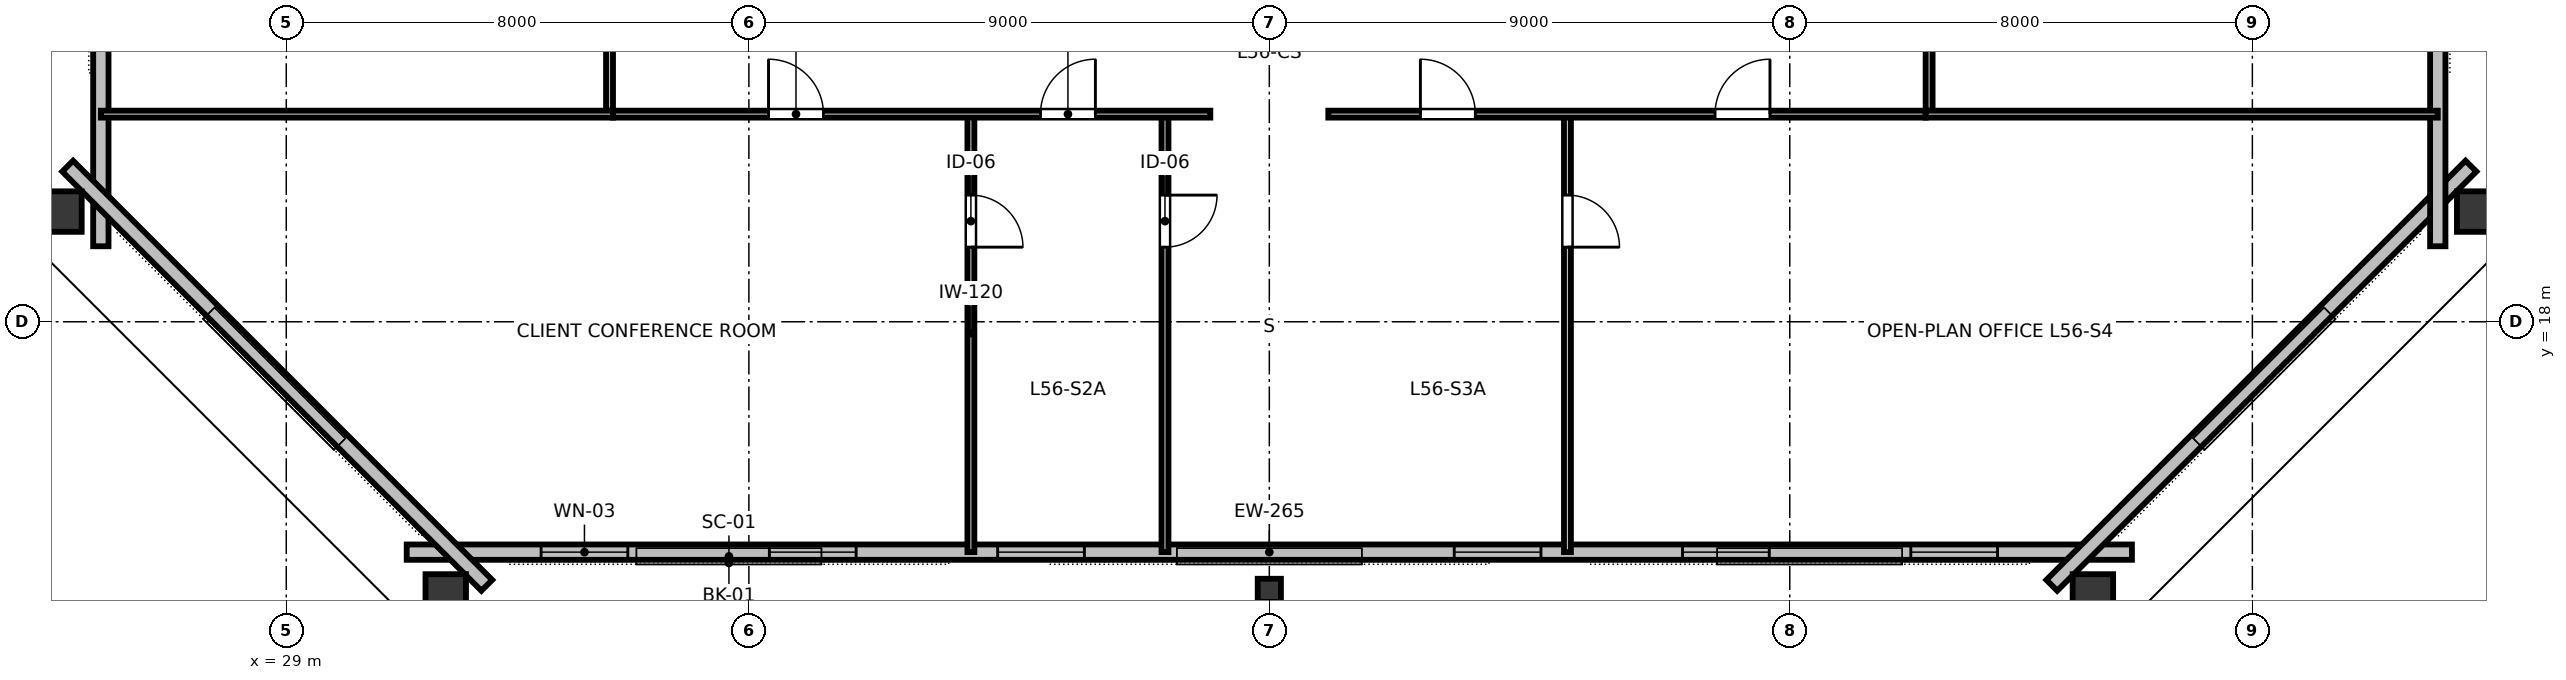
"""IFC4 building model, lengths in metres.
Left out: names, types, materials, properties, quantities, classifications, styles, units other than length and angle.
Written with IfcOpenShell. Run it as: python <this file> out.ifc"""

import sys

from ifc_helpers import new_model, si_unit, direction, frame, frame_2d, origin, origin_2d, place, context, subcontext, project, spatial, rectangle, hollow_rectangle, i_section, extrude, element, fill, save


model = new_model("IFC4")
c1 = context("Model", 3, precision=1e-05, world=origin(), true_north=direction((0.0, 1.0)))
c2 = subcontext(c1, "Body", "Model", "MODEL_VIEW")
j1 = project(units=[si_unit("LENGTHUNIT", "METRE"), si_unit("PLANEANGLEUNIT", "RADIAN")], contexts=[c1])
p1 = place(None, origin())
s1 = spatial("IfcSite", under=j1, at=p1, CompositionType="ELEMENT")
p2 = place(p1, origin())
s2 = spatial("IfcBuilding", under=s1, at=p2, CompositionType="ELEMENT")
p3 = place(p2, frame((0.0, 0.0, 213.0)))
s3 = spatial("IfcBuildingStorey", under=s2, at=p3, CompositionType="ELEMENT", Elevation=213.0)
p4 = place(p3, frame((31.758, 13.21, 0.0), z_axis=(0.0, 0.0, 1.0), x_axis=(1.0, 0.0, 0.0)))
e1 = element("IfcColumn", 1, at=p4, inside=s3, PredefinedType="COLUMN", context=c2, shape_type="SweptSolid", body=[
    extrude(hollow_rectangle(XDim=0.7, YDim=0.85, WallThickness=0.04, at=origin_2d()), origin(), (0.0, 0.0, 1.0), 3.373),
])
p5 = place(p3, frame((46.0, 13.356, 0.0), z_axis=(0.0, 0.0, 1.0), x_axis=(1.0, 0.0, 0.0)))
e2 = element("IfcColumn", 2, at=p5, inside=s3, PredefinedType="COLUMN", context=c2, shape_type="SweptSolid", body=[
    extrude(i_section(OverallWidth=0.401, OverallDepth=0.399, WebThickness=0.025, FlangeThickness=0.04, FilletRadius=0.025, at=origin_2d()), origin(), (0.0, 0.0, 1.0), 3.373),
])
for number, where, z_axis, x_axis in (
    (3, (60.242, 13.21, 0.0), (0.0, 0.0, 1.0), (1.0, 0.0, 0.0)),
    (4, (66.963, 19.905, 0.0), (0.0, 0.0, 1.0), (0.0, 1.0, 0.0)),
    (5, (25.037, 19.905, 0.0), (0.0, 0.0, 1.0), (0.0, 1.0, 0.0)),
):
    element("IfcColumn", number, at=place(p3, frame(where, z_axis=z_axis, x_axis=x_axis)), inside=s3, PredefinedType="COLUMN", context=c2, shape_type="SweptSolid", body=[
        extrude(hollow_rectangle(XDim=0.7, YDim=0.85, WallThickness=0.04, at=origin_2d()), origin(), (0.0, 0.0, 1.0), 3.373),
    ])
p6 = place(p3, frame((31.083, 14.016, 0.0), z_axis=(0.0, 0.0, 1.0), x_axis=(1.0, 0.0, 0.0)))
e6 = element("IfcWall", 6, at=p6, inside=s3, PredefinedType="STANDARD", context=c2, shape_type="SweptSolid", body=[
    extrude(rectangle(XDim=29.834, YDim=0.265, at=frame_2d((14.917, 0.0))), origin(), (0.0, 0.0, 1.0), 3.375),
])
p7 = place(p6, frame((2.324, 0.0, 0.85)))
e7 = element("IfcOpeningElement", 7, at=p7, cuts=e6, PredefinedType="OPENING", context=c2, shape_type="SweptSolid", body=[
    extrude(rectangle(XDim=1.5, YDim=1.85, at=frame_2d((0.75, 0.925))), frame((0.0, 0.142, 0.0), z_axis=(0.0, -1.0, 0.0), x_axis=(1.0, 0.0, 0.0)), (0.0, 0.0, 1.0), 0.285),
])
p8 = place(p6, frame((6.272, 0.0, 0.85)))
e8 = element("IfcOpeningElement", 8, at=p8, cuts=e6, PredefinedType="OPENING", context=c2, shape_type="SweptSolid", body=[
    extrude(rectangle(XDim=1.5, YDim=1.85, at=frame_2d((0.75, 0.925))), frame((0.0, 0.142, 0.0), z_axis=(0.0, -1.0, 0.0), x_axis=(1.0, 0.0, 0.0)), (0.0, 0.0, 1.0), 0.285),
])
p9 = place(p6, frame((10.219, 0.0, 0.85)))
e9 = element("IfcOpeningElement", 9, at=p9, cuts=e6, PredefinedType="OPENING", context=c2, shape_type="SweptSolid", body=[
    extrude(rectangle(XDim=1.5, YDim=1.85, at=frame_2d((0.75, 0.925))), frame((0.0, 0.142, 0.0), z_axis=(0.0, -1.0, 0.0), x_axis=(1.0, 0.0, 0.0)), (0.0, 0.0, 1.0), 0.285),
])
p10 = place(p6, frame((18.115, 0.0, 0.85)))
e10 = element("IfcOpeningElement", 10, at=p10, cuts=e6, PredefinedType="OPENING", context=c2, shape_type="SweptSolid", body=[
    extrude(rectangle(XDim=1.5, YDim=1.85, at=frame_2d((0.75, 0.925))), frame((0.0, 0.142, 0.0), z_axis=(0.0, -1.0, 0.0), x_axis=(1.0, 0.0, 0.0)), (0.0, 0.0, 1.0), 0.285),
])
p11 = place(p6, frame((22.063, 0.0, 0.85)))
e11 = element("IfcOpeningElement", 11, at=p11, cuts=e6, PredefinedType="OPENING", context=c2, shape_type="SweptSolid", body=[
    extrude(rectangle(XDim=1.5, YDim=1.85, at=frame_2d((0.75, 0.925))), frame((0.0, 0.142, 0.0), z_axis=(0.0, -1.0, 0.0), x_axis=(1.0, 0.0, 0.0)), (0.0, 0.0, 1.0), 0.285),
])
p12 = place(p6, frame((26.011, 0.0, 0.85)))
e12 = element("IfcOpeningElement", 12, at=p12, cuts=e6, PredefinedType="OPENING", context=c2, shape_type="SweptSolid", body=[
    extrude(rectangle(XDim=1.5, YDim=1.85, at=frame_2d((0.75, 0.925))), frame((0.0, 0.142, 0.0), z_axis=(0.0, -1.0, 0.0), x_axis=(1.0, 0.0, 0.0)), (0.0, 0.0, 1.0), 0.285),
])
p13 = place(p3, frame((59.532, 13.442, 0.0), z_axis=(0.0, 0.0, 1.0), x_axis=(0.707106781187, 0.707106781187, 0.0)))
e13 = element("IfcWall", 13, at=p13, inside=s3, PredefinedType="STANDARD", context=c2, shape_type="SweptSolid", body=[
    extrude(rectangle(XDim=10.251, YDim=0.265, at=frame_2d((5.125, 0.0))), origin(), (0.0, 0.0, 1.0), 3.375),
])
p14 = place(p3, frame((66.206, 19.305, 0.0), z_axis=(0.0, 0.0, 1.0), x_axis=(0.0, 1.0, 0.0)))
e14 = element("IfcWall", 14, at=p14, inside=s3, PredefinedType="STANDARD", context=c2, shape_type="SweptSolid", body=[
    extrude(rectangle(XDim=25.389, YDim=0.265, at=frame_2d((12.695, 0.0))), origin(), (0.0, 0.0, 1.0), 3.375),
])
p15 = place(p14, frame((6.147, 0.0, 0.85)))
e15 = element("IfcOpeningElement", 15, at=p15, cuts=e14, PredefinedType="OPENING", context=c2, shape_type="SweptSolid", body=[
    extrude(rectangle(XDim=1.5, YDim=1.85, at=frame_2d((0.75, 0.925))), frame((0.0, 0.142, 0.0), z_axis=(0.0, -1.0, 0.0), x_axis=(1.0, 0.0, 0.0)), (0.0, 0.0, 1.0), 0.285),
])
p16 = place(p14, frame((17.742, 0.0, 0.85)))
e16 = element("IfcOpeningElement", 16, at=p16, cuts=e14, PredefinedType="OPENING", context=c2, shape_type="SweptSolid", body=[
    extrude(rectangle(XDim=1.5, YDim=1.85, at=frame_2d((0.75, 0.925))), frame((0.0, 0.142, 0.0), z_axis=(0.0, -1.0, 0.0), x_axis=(1.0, 0.0, 0.0)), (0.0, 0.0, 1.0), 0.285),
])
p17 = place(p3, frame((25.794, 44.695, 0.0), z_axis=(0.0, 0.0, 1.0), x_axis=(0.0, -1.0, 0.0)))
e17 = element("IfcWall", 17, at=p17, inside=s3, PredefinedType="STANDARD", context=c2, shape_type="SweptSolid", body=[
    extrude(rectangle(XDim=25.389, YDim=0.265, at=frame_2d((12.695, 0.0))), origin(), (0.0, 0.0, 1.0), 3.375),
])
p18 = place(p17, frame((6.147, 0.0, 0.85)))
e18 = element("IfcOpeningElement", 18, at=p18, cuts=e17, PredefinedType="OPENING", context=c2, shape_type="SweptSolid", body=[
    extrude(rectangle(XDim=1.5, YDim=1.85, at=frame_2d((0.75, 0.925))), frame((0.0, 0.142, 0.0), z_axis=(0.0, -1.0, 0.0), x_axis=(1.0, 0.0, 0.0)), (0.0, 0.0, 1.0), 0.285),
])
p19 = place(p17, frame((10.012, 0.0, 0.85)))
e19 = element("IfcOpeningElement", 19, at=p19, cuts=e17, PredefinedType="OPENING", context=c2, shape_type="SweptSolid", body=[
    extrude(rectangle(XDim=1.5, YDim=1.85, at=frame_2d((0.75, 0.925))), frame((0.0, 0.142, 0.0), z_axis=(0.0, -1.0, 0.0), x_axis=(1.0, 0.0, 0.0)), (0.0, 0.0, 1.0), 0.285),
])
p20 = place(p17, frame((13.877, 0.0, 0.85)))
e20 = element("IfcOpeningElement", 20, at=p20, cuts=e17, PredefinedType="OPENING", context=c2, shape_type="SweptSolid", body=[
    extrude(rectangle(XDim=1.5, YDim=1.85, at=frame_2d((0.75, 0.925))), frame((0.0, 0.142, 0.0), z_axis=(0.0, -1.0, 0.0), x_axis=(1.0, 0.0, 0.0)), (0.0, 0.0, 1.0), 0.285),
])
p21 = place(p17, frame((17.742, 0.0, 0.85)))
e21 = element("IfcOpeningElement", 21, at=p21, cuts=e17, PredefinedType="OPENING", context=c2, shape_type="SweptSolid", body=[
    extrude(rectangle(XDim=1.5, YDim=1.85, at=frame_2d((0.75, 0.925))), frame((0.0, 0.142, 0.0), z_axis=(0.0, -1.0, 0.0), x_axis=(1.0, 0.0, 0.0)), (0.0, 0.0, 1.0), 0.285),
])
p22 = place(p3, frame((25.22, 20.691, 0.0), z_axis=(0.0, 0.0, 1.0), x_axis=(0.707106781187, -0.707106781187, 0.0)))
e22 = element("IfcWall", 22, at=p22, inside=s3, PredefinedType="STANDARD", context=c2, shape_type="SweptSolid", body=[
    extrude(rectangle(XDim=10.251, YDim=0.265, at=frame_2d((5.125, 0.0))), origin(), (0.0, 0.0, 1.0), 3.375),
])
p23 = place(p3, frame((40.839, 21.59, 0.0), z_axis=(0.0, 0.0, 1.0), x_axis=(0.0, -1.0, 0.0)))
e23 = element("IfcWall", 23, at=p23, inside=s3, PredefinedType="PARTITIONING", context=c2, shape_type="SweptSolid", body=[
    extrude(rectangle(XDim=7.574, YDim=0.12, at=frame_2d((3.787, 0.0))), origin(), (0.0, 0.0, 1.0), 2.655),
])
p24 = place(p23, frame((1.4, 0.0, 0.0)))
e24 = element("IfcOpeningElement", 24, at=p24, cuts=e23, PredefinedType="OPENING", context=c2, shape_type="SweptSolid", body=[
    extrude(rectangle(XDim=0.9, YDim=2.15, at=frame_2d((0.45, 1.075))), frame((0.0, 0.07, 0.0), z_axis=(0.0, -1.0, 0.0), x_axis=(1.0, 0.0, 0.0)), (0.0, 0.0, 1.0), 0.14),
])
p25 = place(p3, frame((44.196, 21.59, 0.0), z_axis=(0.0, 0.0, 1.0), x_axis=(0.0, -1.0, 0.0)))
e25 = element("IfcWall", 25, at=p25, inside=s3, PredefinedType="PARTITIONING", context=c2, shape_type="SweptSolid", body=[
    extrude(rectangle(XDim=7.574, YDim=0.12, at=frame_2d((3.787, 0.0))), origin(), (0.0, 0.0, 1.0), 2.655),
])
p26 = place(p25, frame((1.4, 0.0, 0.0)))
e26 = element("IfcOpeningElement", 26, at=p26, cuts=e25, PredefinedType="OPENING", context=c2, shape_type="SweptSolid", body=[
    extrude(rectangle(XDim=0.9, YDim=2.15, at=frame_2d((0.45, 1.075))), frame((0.0, 0.07, 0.0), z_axis=(0.0, -1.0, 0.0), x_axis=(1.0, 0.0, 0.0)), (0.0, 0.0, 1.0), 0.14),
])
p27 = place(p3, frame((51.156, 21.59, 0.0), z_axis=(0.0, 0.0, 1.0), x_axis=(0.0, -1.0, 0.0)))
e27 = element("IfcWall", 27, at=p27, inside=s3, PredefinedType="PARTITIONING", context=c2, shape_type="SweptSolid", body=[
    extrude(rectangle(XDim=7.574, YDim=0.12, at=frame_2d((3.787, 0.0))), origin(), (0.0, 0.0, 1.0), 2.655),
])
p28 = place(p27, frame((1.4, 0.0, 0.0)))
e28 = element("IfcOpeningElement", 28, at=p28, cuts=e27, PredefinedType="OPENING", context=c2, shape_type="SweptSolid", body=[
    extrude(rectangle(XDim=0.9, YDim=2.15, at=frame_2d((0.45, 1.075))), frame((0.0, 0.07, 0.0), z_axis=(0.0, -1.0, 0.0), x_axis=(1.0, 0.0, 0.0)), (0.0, 0.0, 1.0), 0.14),
])
p29 = place(p3, frame((34.65, 21.59, 0.0), z_axis=(0.0, 0.0, 1.0), x_axis=(1.0, 0.0, 0.0)))
e29 = element("IfcWall", 29, at=p29, inside=s3, PredefinedType="PARTITIONING", context=c2, shape_type="SweptSolid", body=[
    extrude(rectangle(XDim=10.33, YDim=0.12, at=frame_2d((5.165, 0.0))), origin(), (0.0, 0.0, 1.0), 2.655),
])
p30 = place(p29, frame((2.69, 0.0, 0.0)))
e30 = element("IfcOpeningElement", 30, at=p30, cuts=e29, PredefinedType="OPENING", context=c2, shape_type="SweptSolid", body=[
    extrude(rectangle(XDim=0.95, YDim=2.15, at=frame_2d((0.475, 1.075))), frame((0.0, 0.07, 0.0), z_axis=(0.0, -1.0, 0.0), x_axis=(1.0, 0.0, 0.0)), (0.0, 0.0, 1.0), 0.14),
])
p31 = place(p29, frame((7.393, 0.0, 0.0)))
e31 = element("IfcOpeningElement", 31, at=p31, cuts=e29, PredefinedType="OPENING", context=c2, shape_type="SweptSolid", body=[
    extrude(rectangle(XDim=0.95, YDim=2.15, at=frame_2d((0.475, 1.075))), frame((0.0, 0.07, 0.0), z_axis=(0.0, -1.0, 0.0), x_axis=(1.0, 0.0, 0.0)), (0.0, 0.0, 1.0), 0.14),
])
p32 = place(p3, frame((47.02, 21.59, 0.0), z_axis=(0.0, 0.0, 1.0), x_axis=(1.0, 0.0, 0.0)))
e32 = element("IfcWall", 32, at=p32, inside=s3, PredefinedType="PARTITIONING", context=c2, shape_type="SweptSolid", body=[
    extrude(rectangle(XDim=10.33, YDim=0.12, at=frame_2d((5.165, 0.0))), origin(), (0.0, 0.0, 1.0), 2.655),
])
p33 = place(p32, frame((1.593, 0.0, 0.0)))
e33 = element("IfcOpeningElement", 33, at=p33, cuts=e32, PredefinedType="OPENING", context=c2, shape_type="SweptSolid", body=[
    extrude(rectangle(XDim=0.95, YDim=2.15, at=frame_2d((0.475, 1.075))), frame((0.0, 0.07, 0.0), z_axis=(0.0, -1.0, 0.0), x_axis=(1.0, 0.0, 0.0)), (0.0, 0.0, 1.0), 0.14),
])
p34 = place(p32, frame((6.688, 0.0, 0.0)))
e34 = element("IfcOpeningElement", 34, at=p34, cuts=e32, PredefinedType="OPENING", context=c2, shape_type="SweptSolid", body=[
    extrude(rectangle(XDim=0.95, YDim=2.15, at=frame_2d((0.475, 1.075))), frame((0.0, 0.07, 0.0), z_axis=(0.0, -1.0, 0.0), x_axis=(1.0, 0.0, 0.0)), (0.0, 0.0, 1.0), 0.14),
])
p35 = place(p3, frame((34.59, 21.65, 0.0), z_axis=(0.0, 0.0, 1.0), x_axis=(0.0, 1.0, 0.0)))
e35 = element("IfcWall", 35, at=p35, inside=s3, PredefinedType="PARTITIONING", context=c2, shape_type="SweptSolid", body=[
    extrude(rectangle(XDim=20.7, YDim=0.12, at=frame_2d((10.35, 0.0))), origin(), (0.0, 0.0, 1.0), 2.655),
])
p36 = place(p35, frame((9.875, 0.0, 0.0)))
e36 = element("IfcOpeningElement", 36, at=p36, cuts=e35, PredefinedType="OPENING", context=c2, shape_type="SweptSolid", body=[
    extrude(rectangle(XDim=0.95, YDim=2.15, at=frame_2d((0.475, 1.075))), frame((0.0, 0.07, 0.0), z_axis=(0.0, -1.0, 0.0), x_axis=(1.0, 0.0, 0.0)), (0.0, 0.0, 1.0), 0.14),
])
p37 = place(p3, frame((57.41, 21.65, 0.0), z_axis=(0.0, 0.0, 1.0), x_axis=(0.0, 1.0, 0.0)))
e37 = element("IfcWall", 37, at=p37, inside=s3, PredefinedType="PARTITIONING", context=c2, shape_type="SweptSolid", body=[
    extrude(rectangle(XDim=20.7, YDim=0.12, at=frame_2d((10.35, 0.0))), origin(), (0.0, 0.0, 1.0), 2.655),
])
p38 = place(p37, frame((3.546, 0.0, 0.0)))
e38 = element("IfcOpeningElement", 38, at=p38, cuts=e37, PredefinedType="OPENING", context=c2, shape_type="SweptSolid", body=[
    extrude(rectangle(XDim=0.95, YDim=2.15, at=frame_2d((0.475, 1.075))), frame((0.0, 0.07, 0.0), z_axis=(0.0, -1.0, 0.0), x_axis=(1.0, 0.0, 0.0)), (0.0, 0.0, 1.0), 0.14),
])
p39 = place(p37, frame((10.054, 0.0, 0.0)))
e39 = element("IfcOpeningElement", 39, at=p39, cuts=e37, PredefinedType="OPENING", context=c2, shape_type="SweptSolid", body=[
    extrude(rectangle(XDim=0.95, YDim=2.15, at=frame_2d((0.475, 1.075))), frame((0.0, 0.07, 0.0), z_axis=(0.0, -1.0, 0.0), x_axis=(1.0, 0.0, 0.0)), (0.0, 0.0, 1.0), 0.14),
])
p40 = place(p37, frame((16.384, 0.0, 0.0)))
e40 = element("IfcOpeningElement", 40, at=p40, cuts=e37, PredefinedType="OPENING", context=c2, shape_type="SweptSolid", body=[
    extrude(rectangle(XDim=0.95, YDim=2.15, at=frame_2d((0.475, 1.075))), frame((0.0, 0.07, 0.0), z_axis=(0.0, -1.0, 0.0), x_axis=(1.0, 0.0, 0.0)), (0.0, 0.0, 1.0), 0.14),
])
for number, where, z_axis, x_axis in (
    (41, (34.65, 21.59, 0.0), (0.0, 0.0, 1.0), (-1.0, 0.0, 0.0)),
    (42, (57.35, 21.59, 0.0), (0.0, 0.0, 1.0), (1.0, 0.0, 0.0)),
):
    element("IfcWall", number, at=place(p3, frame(where, z_axis=z_axis, x_axis=x_axis)), inside=s3, PredefinedType="PARTITIONING", context=c2, shape_type="SweptSolid", body=[
        extrude(rectangle(XDim=8.856, YDim=0.12, at=frame_2d((4.428, 0.0))), origin(), (0.0, 0.0, 1.0), 2.655),
    ])
p41 = place(p7, origin())
e43 = element("IfcWindow", 43, at=p41, inside=s3, PartitioningType="SINGLE_PANEL", PredefinedType="WINDOW", context=c2, shape_type="SweptSolid", body=[
    extrude(rectangle(XDim=1.5, YDim=1.85, at=frame_2d((0.75, 0.925))), frame((0.0, 0.03, 0.0), z_axis=(0.0, -1.0, 0.0), x_axis=(1.0, 0.0, 0.0)), (0.0, 0.0, 1.0), 0.06),
])
fill(e7, e43)
p42 = place(p8, origin())
e44 = element("IfcWindow", 44, at=p42, inside=s3, PartitioningType="SINGLE_PANEL", PredefinedType="WINDOW", context=c2, shape_type="SweptSolid", body=[
    extrude(rectangle(XDim=1.5, YDim=1.85, at=frame_2d((0.75, 0.925))), frame((0.0, 0.03, 0.0), z_axis=(0.0, -1.0, 0.0), x_axis=(1.0, 0.0, 0.0)), (0.0, 0.0, 1.0), 0.06),
])
fill(e8, e44)
p43 = place(p9, origin())
e45 = element("IfcWindow", 45, at=p43, inside=s3, PartitioningType="SINGLE_PANEL", PredefinedType="WINDOW", context=c2, shape_type="SweptSolid", body=[
    extrude(rectangle(XDim=1.5, YDim=1.85, at=frame_2d((0.75, 0.925))), frame((0.0, 0.03, 0.0), z_axis=(0.0, -1.0, 0.0), x_axis=(1.0, 0.0, 0.0)), (0.0, 0.0, 1.0), 0.06),
])
fill(e9, e45)
p44 = place(p10, origin())
e46 = element("IfcWindow", 46, at=p44, inside=s3, PartitioningType="SINGLE_PANEL", PredefinedType="WINDOW", context=c2, shape_type="SweptSolid", body=[
    extrude(rectangle(XDim=1.5, YDim=1.85, at=frame_2d((0.75, 0.925))), frame((0.0, 0.03, 0.0), z_axis=(0.0, -1.0, 0.0), x_axis=(1.0, 0.0, 0.0)), (0.0, 0.0, 1.0), 0.06),
])
fill(e10, e46)
p45 = place(p11, origin())
e47 = element("IfcWindow", 47, at=p45, inside=s3, PartitioningType="SINGLE_PANEL", PredefinedType="WINDOW", context=c2, shape_type="SweptSolid", body=[
    extrude(rectangle(XDim=1.5, YDim=1.85, at=frame_2d((0.75, 0.925))), frame((0.0, 0.03, 0.0), z_axis=(0.0, -1.0, 0.0), x_axis=(1.0, 0.0, 0.0)), (0.0, 0.0, 1.0), 0.06),
])
fill(e11, e47)
p46 = place(p12, origin())
e48 = element("IfcWindow", 48, at=p46, inside=s3, PartitioningType="SINGLE_PANEL", PredefinedType="WINDOW", context=c2, shape_type="SweptSolid", body=[
    extrude(rectangle(XDim=1.5, YDim=1.85, at=frame_2d((0.75, 0.925))), frame((0.0, 0.03, 0.0), z_axis=(0.0, -1.0, 0.0), x_axis=(1.0, 0.0, 0.0)), (0.0, 0.0, 1.0), 0.06),
])
fill(e12, e48)
p47 = place(p24, origin())
e49 = element("IfcDoor", 49, at=p47, inside=s3, OperationType="SINGLE_SWING_RIGHT", PredefinedType="DOOR", context=c2, shape_type="SweptSolid", body=[
    extrude(rectangle(XDim=0.9, YDim=2.15, at=frame_2d((0.45, 1.075))), frame((0.0, 0.025, 0.0), z_axis=(0.0, -1.0, 0.0), x_axis=(1.0, 0.0, 0.0)), (0.0, 0.0, 1.0), 0.05),
])
fill(e24, e49)
p48 = place(p26, origin())
e50 = element("IfcDoor", 50, at=p48, inside=s3, OperationType="SINGLE_SWING_LEFT", PredefinedType="DOOR", context=c2, shape_type="SweptSolid", body=[
    extrude(rectangle(XDim=0.9, YDim=2.15, at=frame_2d((0.45, 1.075))), frame((0.0, 0.025, 0.0), z_axis=(0.0, -1.0, 0.0), x_axis=(1.0, 0.0, 0.0)), (0.0, 0.0, 1.0), 0.05),
])
fill(e26, e50)
p49 = place(p28, origin())
e51 = element("IfcDoor", 51, at=p49, inside=s3, OperationType="SINGLE_SWING_RIGHT", PredefinedType="DOOR", context=c2, shape_type="SweptSolid", body=[
    extrude(rectangle(XDim=0.9, YDim=2.15, at=frame_2d((0.45, 1.075))), frame((0.0, 0.025, 0.0), z_axis=(0.0, -1.0, 0.0), x_axis=(1.0, 0.0, 0.0)), (0.0, 0.0, 1.0), 0.05),
])
fill(e28, e51)
p50 = place(p30, origin())
e52 = element("IfcDoor", 52, at=p50, inside=s3, OperationType="SINGLE_SWING_LEFT", PredefinedType="DOOR", context=c2, shape_type="SweptSolid", body=[
    extrude(rectangle(XDim=0.95, YDim=2.15, at=frame_2d((0.475, 1.075))), frame((0.0, 0.025, 0.0), z_axis=(0.0, -1.0, 0.0), x_axis=(1.0, 0.0, 0.0)), (0.0, 0.0, 1.0), 0.05),
])
fill(e30, e52)
p51 = place(p31, origin())
e53 = element("IfcDoor", 53, at=p51, inside=s3, OperationType="SINGLE_SWING_RIGHT", PredefinedType="DOOR", context=c2, shape_type="SweptSolid", body=[
    extrude(rectangle(XDim=0.95, YDim=2.15, at=frame_2d((0.475, 1.075))), frame((0.0, 0.025, 0.0), z_axis=(0.0, -1.0, 0.0), x_axis=(1.0, 0.0, 0.0)), (0.0, 0.0, 1.0), 0.05),
])
fill(e31, e53)
p52 = place(p33, origin())
e54 = element("IfcDoor", 54, at=p52, inside=s3, OperationType="SINGLE_SWING_LEFT", PredefinedType="DOOR", context=c2, shape_type="SweptSolid", body=[
    extrude(rectangle(XDim=0.95, YDim=2.15, at=frame_2d((0.475, 1.075))), frame((0.0, 0.025, 0.0), z_axis=(0.0, -1.0, 0.0), x_axis=(1.0, 0.0, 0.0)), (0.0, 0.0, 1.0), 0.05),
])
fill(e33, e54)
p53 = place(p34, origin())
e55 = element("IfcDoor", 55, at=p53, inside=s3, OperationType="SINGLE_SWING_RIGHT", PredefinedType="DOOR", context=c2, shape_type="SweptSolid", body=[
    extrude(rectangle(XDim=0.95, YDim=2.15, at=frame_2d((0.475, 1.075))), frame((0.0, 0.025, 0.0), z_axis=(0.0, -1.0, 0.0), x_axis=(1.0, 0.0, 0.0)), (0.0, 0.0, 1.0), 0.05),
])
fill(e34, e55)
save(model, sys.argv[1])
